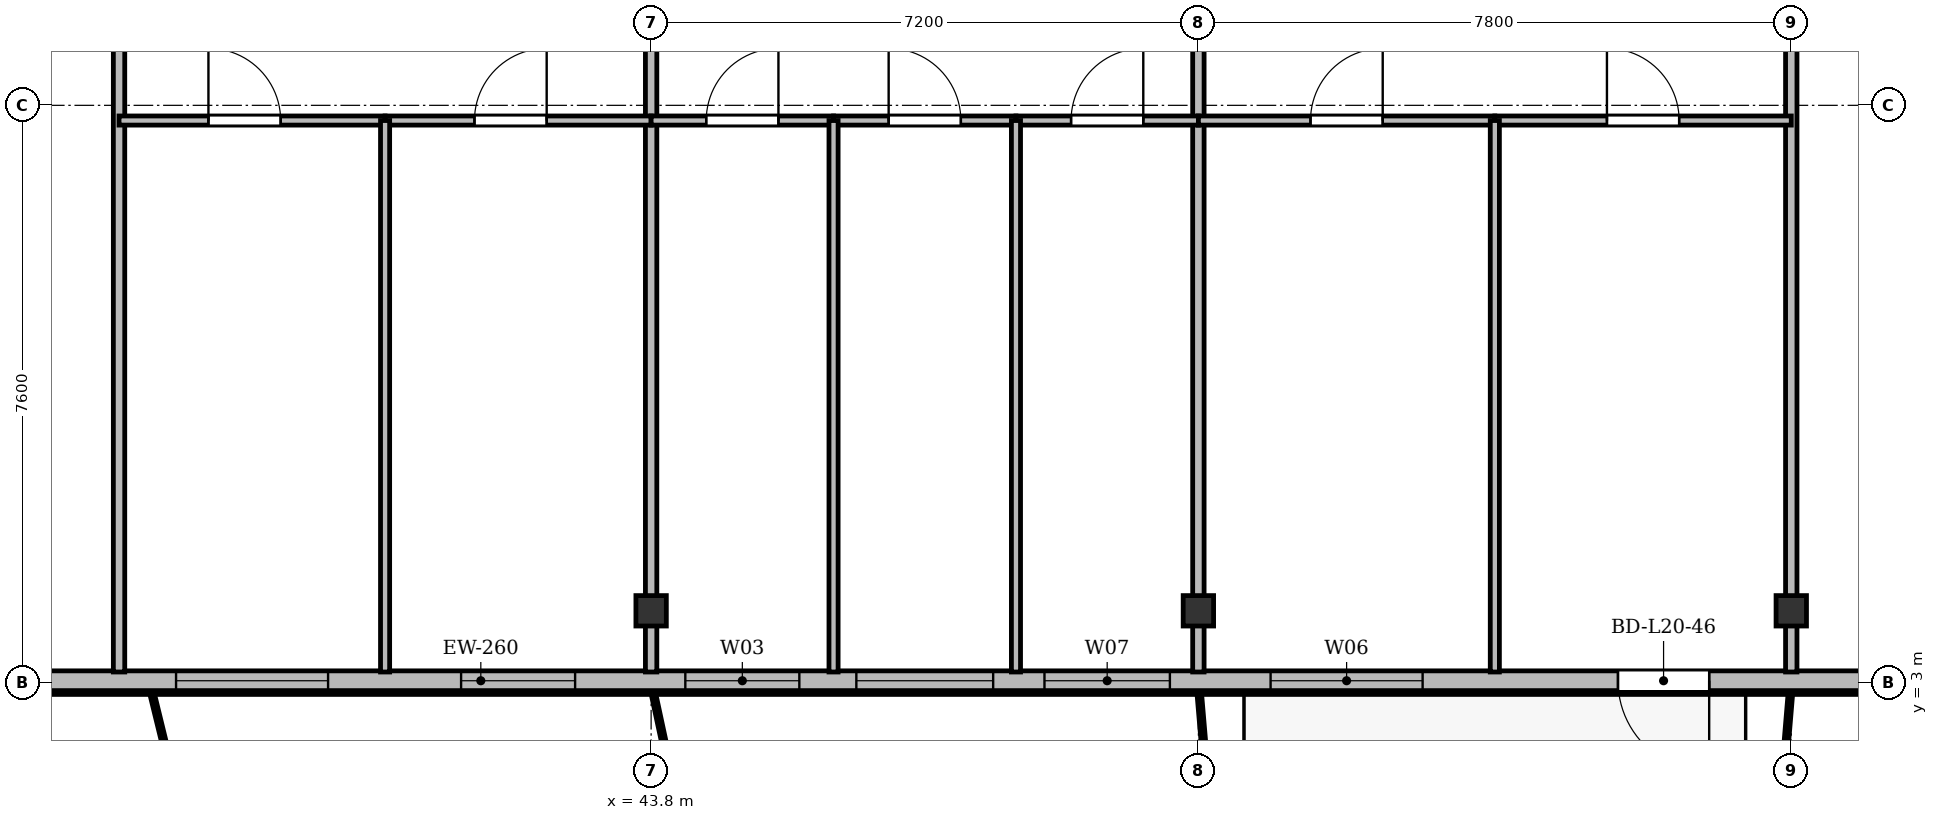
"""IFC4 building model, lengths in metres.
Left out: names, types, materials, properties, quantities, classifications, styles, units other than length and angle.
Written with IfcOpenShell. Run it as: python <this file> out.ifc"""

import sys

from ifc_helpers import new_model, si_unit, direction, frame, frame_2d, origin, origin_2d, place, context, subcontext, project, spatial, rectangle, i_section, extrude, source, transform, mapped, element, fill, save


model = new_model("IFC4")
c1 = context("Model", 3, precision=1e-05, world=origin(), true_north=direction((0.0, 1.0)))
c2 = subcontext(c1, "Body", "Model", "MODEL_VIEW")
j1 = project(units=[si_unit("LENGTHUNIT", "METRE"), si_unit("PLANEANGLEUNIT", "RADIAN")], contexts=[c1])
p1 = place(None, origin())
s1 = spatial("IfcSite", under=j1, at=p1, CompositionType="ELEMENT")
p2 = place(p1, origin())
s2 = spatial("IfcBuilding", under=s1, at=p2, CompositionType="ELEMENT")
p3 = place(p2, frame((0.0, 0.0, 81.7)))
s3 = spatial("IfcBuildingStorey", under=s2, at=p3, CompositionType="ELEMENT", Elevation=81.7)
m1 = source(origin(), c2, "Body", "SweptSolid", [
    extrude(i_section(OverallWidth=0.4, OverallDepth=0.4, WebThickness=0.022, FlangeThickness=0.035, at=origin_2d()), origin(), (0.0, 0.0, 1.0), 3.6),
])
for number, where, z_axis, x_axis in (
    (1, (43.8, 3.95, 0.0), (0.0, 0.0, 1.0), (1.0, 0.0, 0.0)),
    (2, (51.0, 3.95, 0.0), (0.0, 0.0, 1.0), (1.0, 0.0, 0.0)),
    (3, (58.8, 3.95, 0.0), (0.0, 0.0, 1.0), (1.0, 0.0, 0.0)),
):
    element("IfcColumn", number, at=place(p3, frame(where, z_axis=z_axis, x_axis=x_axis)), inside=s3, PredefinedType="COLUMN", context=c2, shape_type="MappedRepresentation", body=[
        mapped(m1, transform((0.0, 0.0, 0.0), x_axis=(1.0, 0.0, 0.0), y_axis=(0.0, 1.0, 0.0), z_axis=(0.0, 0.0, 1.0), scale=1.0)),
    ])
p4 = place(p3, frame((66.9, 3.03, 0.0), z_axis=(0.0, 0.0, 1.0), x_axis=(-1.0, 0.0, 0.0)))
e4 = element("IfcWall", 4, at=p4, inside=s3, PredefinedType="SOLIDWALL", context=c2, shape_type="SweptSolid", body=[
    extrude(rectangle(XDim=59.4, YDim=0.26, at=frame_2d((29.7, 0.0))), origin(), (0.0, 0.0, 1.0), 3.34),
])
p5 = place(p4, frame((0.795, 0.0, 0.9)))
e5 = element("IfcOpeningElement", 5, at=p5, cuts=e4, PredefinedType="OPENING", context=c2, shape_type="SweptSolid", body=[
    extrude(rectangle(XDim=1.8, YDim=1.8, at=frame_2d((0.9, 0.9))), frame((0.0, 0.14, 0.0), z_axis=(0.0, -1.0, 0.0), x_axis=(1.0, 0.0, 0.0)), (0.0, 0.0, 1.0), 0.28),
])
p6 = place(p4, frame((4.6, 0.0, 0.9)))
e6 = element("IfcOpeningElement", 6, at=p6, cuts=e4, PredefinedType="OPENING", context=c2, shape_type="SweptSolid", body=[
    extrude(rectangle(XDim=2.2, YDim=1.8, at=frame_2d((1.1, 0.9))), frame((0.0, 0.14, 0.0), z_axis=(0.0, -1.0, 0.0), x_axis=(1.0, 0.0, 0.0)), (0.0, 0.0, 1.0), 0.28),
])
p7 = place(p4, frame((9.18, 0.0, 0.0)))
e7 = element("IfcOpeningElement", 7, at=p7, cuts=e4, PredefinedType="OPENING", context=c2, shape_type="SweptSolid", body=[
    extrude(rectangle(XDim=1.2, YDim=2.2, at=frame_2d((0.6, 1.1))), frame((0.0, 0.14, 0.0), z_axis=(0.0, -1.0, 0.0), x_axis=(1.0, 0.0, 0.0)), (0.0, 0.0, 1.0), 0.28),
])
p8 = place(p4, frame((12.95, 0.0, 0.9)))
e8 = element("IfcOpeningElement", 8, at=p8, cuts=e4, PredefinedType="OPENING", context=c2, shape_type="SweptSolid", body=[
    extrude(rectangle(XDim=2.0, YDim=1.95, at=frame_2d((1.0, 0.975))), frame((0.0, 0.14, 0.0), z_axis=(0.0, -1.0, 0.0), x_axis=(1.0, 0.0, 0.0)), (0.0, 0.0, 1.0), 0.28),
])
p9 = place(p4, frame((16.275, 0.0, 0.9)))
e9 = element("IfcOpeningElement", 9, at=p9, cuts=e4, PredefinedType="OPENING", context=c2, shape_type="SweptSolid", body=[
    extrude(rectangle(XDim=1.65, YDim=1.85, at=frame_2d((0.825, 0.925))), frame((0.0, 0.14, 0.0), z_axis=(0.0, -1.0, 0.0), x_axis=(1.0, 0.0, 0.0)), (0.0, 0.0, 1.0), 0.28),
])
p10 = place(p4, frame((18.6, 0.0, 0.9)))
e10 = element("IfcOpeningElement", 10, at=p10, cuts=e4, PredefinedType="OPENING", context=c2, shape_type="SweptSolid", body=[
    extrude(rectangle(XDim=1.8, YDim=1.8, at=frame_2d((0.9, 0.9))), frame((0.0, 0.14, 0.0), z_axis=(0.0, -1.0, 0.0), x_axis=(1.0, 0.0, 0.0)), (0.0, 0.0, 1.0), 0.28),
])
p11 = place(p4, frame((21.15, 0.0, 0.9)))
e11 = element("IfcOpeningElement", 11, at=p11, cuts=e4, PredefinedType="OPENING", context=c2, shape_type="SweptSolid", body=[
    extrude(rectangle(XDim=1.5, YDim=1.75, at=frame_2d((0.75, 0.875))), frame((0.0, 0.14, 0.0), z_axis=(0.0, -1.0, 0.0), x_axis=(1.0, 0.0, 0.0)), (0.0, 0.0, 1.0), 0.28),
])
p12 = place(p4, frame((24.1, 0.0, 0.9)))
e12 = element("IfcOpeningElement", 12, at=p12, cuts=e4, PredefinedType="OPENING", context=c2, shape_type="SweptSolid", body=[
    extrude(rectangle(XDim=1.5, YDim=1.75, at=frame_2d((0.75, 0.875))), frame((0.0, 0.14, 0.0), z_axis=(0.0, -1.0, 0.0), x_axis=(1.0, 0.0, 0.0)), (0.0, 0.0, 1.0), 0.28),
])
p13 = place(p4, frame((27.35, 0.0, 0.9)))
e13 = element("IfcOpeningElement", 13, at=p13, cuts=e4, PredefinedType="OPENING", context=c2, shape_type="SweptSolid", body=[
    extrude(rectangle(XDim=2.0, YDim=1.95, at=frame_2d((1.0, 0.975))), frame((0.0, 0.14, 0.0), z_axis=(0.0, -1.0, 0.0), x_axis=(1.0, 0.0, 0.0)), (0.0, 0.0, 1.0), 0.28),
])
p14 = place(p4, frame((32.375, 0.0, 0.9)))
e14 = element("IfcOpeningElement", 14, at=p14, cuts=e4, PredefinedType="OPENING", context=c2, shape_type="SweptSolid", body=[
    extrude(rectangle(XDim=1.65, YDim=1.85, at=frame_2d((0.825, 0.925))), frame((0.0, 0.14, 0.0), z_axis=(0.0, -1.0, 0.0), x_axis=(1.0, 0.0, 0.0)), (0.0, 0.0, 1.0), 0.28),
])
p15 = place(p4, frame((40.301, 0.0, 0.0)))
e15 = element("IfcOpeningElement", 15, at=p15, cuts=e4, PredefinedType="OPENING", context=c2, shape_type="SweptSolid", body=[
    extrude(rectangle(XDim=1.2, YDim=2.2, at=frame_2d((0.6, 1.1))), frame((0.0, 0.14, 0.0), z_axis=(0.0, -1.0, 0.0), x_axis=(1.0, 0.0, 0.0)), (0.0, 0.0, 1.0), 0.28),
])
p16 = place(p4, frame((46.3, 0.0, 0.9)))
e16 = element("IfcOpeningElement", 16, at=p16, cuts=e4, PredefinedType="OPENING", context=c2, shape_type="SweptSolid", body=[
    extrude(rectangle(XDim=2.2, YDim=1.8, at=frame_2d((1.1, 0.9))), frame((0.0, 0.14, 0.0), z_axis=(0.0, -1.0, 0.0), x_axis=(1.0, 0.0, 0.0)), (0.0, 0.0, 1.0), 0.28),
])
p17 = place(p4, frame((54.558, 0.0, 0.0)))
e17 = element("IfcOpeningElement", 17, at=p17, cuts=e4, PredefinedType="OPENING", context=c2, shape_type="SweptSolid", body=[
    extrude(rectangle(XDim=1.2, YDim=2.2, at=frame_2d((0.6, 1.1))), frame((0.0, 0.14, 0.0), z_axis=(0.0, -1.0, 0.0), x_axis=(1.0, 0.0, 0.0)), (0.0, 0.0, 1.0), 0.28),
])
p18 = place(p4, frame((56.805, 0.0, 0.9)))
e18 = element("IfcOpeningElement", 18, at=p18, cuts=e4, PredefinedType="OPENING", context=c2, shape_type="SweptSolid", body=[
    extrude(rectangle(XDim=2.0, YDim=1.95, at=frame_2d((1.0, 0.975))), frame((0.0, 0.14, 0.0), z_axis=(0.0, -1.0, 0.0), x_axis=(1.0, 0.0, 0.0)), (0.0, 0.0, 1.0), 0.28),
])
p19 = place(p3, frame((36.8, 3.145, 0.0), z_axis=(0.0, 0.0, 1.0), x_axis=(0.0, 1.0, 0.0)))
e19 = element("IfcWall", 19, at=p19, inside=s3, PredefinedType="PARTITIONING", context=c2, shape_type="SweptSolid", body=[
    extrude(rectangle(XDim=24.455, YDim=0.15, at=frame_2d((12.228, 0.0))), origin(), (0.0, 0.0, 1.0), 2.752),
])
for number, where, z_axis, x_axis in (
    (20, (43.8, 3.145, 0.0), (0.0, 0.0, 1.0), (0.0, 1.0, 0.0)),
    (21, (51.0, 3.145, 0.0), (0.0, 0.0, 1.0), (0.0, 1.0, 0.0)),
    (22, (58.8, 3.145, 0.0), (0.0, 0.0, 1.0), (0.0, 1.0, 0.0)),
):
    element("IfcWall", number, at=place(p3, frame(where, z_axis=z_axis, x_axis=x_axis)), inside=s3, PredefinedType="PARTITIONING", context=c2, shape_type="SweptSolid", body=[
        extrude(rectangle(XDim=24.455, YDim=0.15, at=frame_2d((12.228, 0.0))), origin(), (0.0, 0.0, 1.0), 2.84),
    ])
p20 = place(p3, frame((36.8, 10.4, 0.0), z_axis=(0.0, 0.0, 1.0), x_axis=(1.0, 0.0, 0.0)))
e23 = element("IfcWall", 23, at=p20, inside=s3, PredefinedType="PARTITIONING", context=c2, shape_type="SweptSolid", body=[
    extrude(rectangle(XDim=3.5, YDim=0.12, at=frame_2d((1.75, 0.0))), origin(), (0.0, 0.0, 1.0), 3.34),
])
p21 = place(p20, frame((1.176, 0.0, 0.0)))
e24 = element("IfcOpeningElement", 24, at=p21, cuts=e23, PredefinedType="OPENING", context=c2, shape_type="SweptSolid", body=[
    extrude(rectangle(XDim=0.95, YDim=2.15, at=frame_2d((0.475, 1.075))), frame((0.0, 0.07, 0.0), z_axis=(0.0, -1.0, 0.0), x_axis=(1.0, 0.0, 0.0)), (0.0, 0.0, 1.0), 0.14),
])
p22 = place(p3, frame((40.3, 10.4, 0.0), z_axis=(0.0, 0.0, 1.0), x_axis=(1.0, 0.0, 0.0)))
e25 = element("IfcWall", 25, at=p22, inside=s3, PredefinedType="PARTITIONING", context=c2, shape_type="SweptSolid", body=[
    extrude(rectangle(XDim=3.5, YDim=0.12, at=frame_2d((1.75, 0.0))), origin(), (0.0, 0.0, 1.0), 2.84),
])
p23 = place(p22, frame((1.176, 0.0, 0.0)))
e26 = element("IfcOpeningElement", 26, at=p23, cuts=e25, PredefinedType="OPENING", context=c2, shape_type="SweptSolid", body=[
    extrude(rectangle(XDim=0.95, YDim=2.15, at=frame_2d((0.475, 1.075))), frame((0.0, 0.07, 0.0), z_axis=(0.0, -1.0, 0.0), x_axis=(1.0, 0.0, 0.0)), (0.0, 0.0, 1.0), 0.14),
])
p24 = place(p3, frame((40.3, 3.145, 0.0), z_axis=(0.0, 0.0, 1.0), x_axis=(0.0, 1.0, 0.0)))
e27 = element("IfcWall", 27, at=p24, inside=s3, PredefinedType="PARTITIONING", context=c2, shape_type="SweptSolid", body=[
    extrude(rectangle(XDim=7.255, YDim=0.12, at=frame_2d((3.627, 0.0))), origin(), (0.0, 0.0, 1.0), 2.752),
])
p25 = place(p3, frame((43.8, 10.4, 0.0), z_axis=(0.0, 0.0, 1.0), x_axis=(1.0, 0.0, 0.0)))
e28 = element("IfcWall", 28, at=p25, inside=s3, PredefinedType="PARTITIONING", context=c2, shape_type="SweptSolid", body=[
    extrude(rectangle(XDim=2.4, YDim=0.12, at=frame_2d((1.2, 0.0))), origin(), (0.0, 0.0, 1.0), 2.84),
])
p26 = place(p25, frame((0.725, 0.0, 0.0)))
e29 = element("IfcOpeningElement", 29, at=p26, cuts=e28, PredefinedType="OPENING", context=c2, shape_type="SweptSolid", body=[
    extrude(rectangle(XDim=0.95, YDim=2.15, at=frame_2d((0.475, 1.075))), frame((0.0, 0.07, 0.0), z_axis=(0.0, -1.0, 0.0), x_axis=(1.0, 0.0, 0.0)), (0.0, 0.0, 1.0), 0.14),
])
p27 = place(p3, frame((46.2, 10.4, 0.0), z_axis=(0.0, 0.0, 1.0), x_axis=(1.0, 0.0, 0.0)))
e30 = element("IfcWall", 30, at=p27, inside=s3, PredefinedType="PARTITIONING", context=c2, shape_type="SweptSolid", body=[
    extrude(rectangle(XDim=2.4, YDim=0.12, at=frame_2d((1.2, 0.0))), origin(), (0.0, 0.0, 1.0), 3.34),
])
p28 = place(p27, frame((0.725, 0.0, 0.0)))
e31 = element("IfcOpeningElement", 31, at=p28, cuts=e30, PredefinedType="OPENING", context=c2, shape_type="SweptSolid", body=[
    extrude(rectangle(XDim=0.95, YDim=2.15, at=frame_2d((0.475, 1.075))), frame((0.0, 0.07, 0.0), z_axis=(0.0, -1.0, 0.0), x_axis=(1.0, 0.0, 0.0)), (0.0, 0.0, 1.0), 0.14),
])
p29 = place(p3, frame((46.2, 3.145, 0.0), z_axis=(0.0, 0.0, 1.0), x_axis=(0.0, 1.0, 0.0)))
e32 = element("IfcWall", 32, at=p29, inside=s3, PredefinedType="PARTITIONING", context=c2, shape_type="SweptSolid", body=[
    extrude(rectangle(XDim=7.255, YDim=0.12, at=frame_2d((3.627, 0.0))), origin(), (0.0, 0.0, 1.0), 2.752),
])
p30 = place(p3, frame((48.6, 10.4, 0.0), z_axis=(0.0, 0.0, 1.0), x_axis=(1.0, 0.0, 0.0)))
e33 = element("IfcWall", 33, at=p30, inside=s3, PredefinedType="PARTITIONING", context=c2, shape_type="SweptSolid", body=[
    extrude(rectangle(XDim=2.4, YDim=0.12, at=frame_2d((1.2, 0.0))), origin(), (0.0, 0.0, 1.0), 2.84),
])
p31 = place(p30, frame((0.725, 0.0, 0.0)))
e34 = element("IfcOpeningElement", 34, at=p31, cuts=e33, PredefinedType="OPENING", context=c2, shape_type="SweptSolid", body=[
    extrude(rectangle(XDim=0.95, YDim=2.15, at=frame_2d((0.475, 1.075))), frame((0.0, 0.07, 0.0), z_axis=(0.0, -1.0, 0.0), x_axis=(1.0, 0.0, 0.0)), (0.0, 0.0, 1.0), 0.14),
])
p32 = place(p3, frame((48.6, 3.145, 0.0), z_axis=(0.0, 0.0, 1.0), x_axis=(0.0, 1.0, 0.0)))
e35 = element("IfcWall", 35, at=p32, inside=s3, PredefinedType="PARTITIONING", context=c2, shape_type="SweptSolid", body=[
    extrude(rectangle(XDim=7.255, YDim=0.12, at=frame_2d((3.627, 0.0))), origin(), (0.0, 0.0, 1.0), 2.752),
])
p33 = place(p3, frame((51.0, 10.4, 0.0), z_axis=(0.0, 0.0, 1.0), x_axis=(1.0, 0.0, 0.0)))
e36 = element("IfcWall", 36, at=p33, inside=s3, PredefinedType="PARTITIONING", context=c2, shape_type="SweptSolid", body=[
    extrude(rectangle(XDim=3.9, YDim=0.12, at=frame_2d((1.95, 0.0))), origin(), (0.0, 0.0, 1.0), 2.84),
])
p34 = place(p33, frame((1.475, 0.0, 0.0)))
e37 = element("IfcOpeningElement", 37, at=p34, cuts=e36, PredefinedType="OPENING", context=c2, shape_type="SweptSolid", body=[
    extrude(rectangle(XDim=0.95, YDim=2.15, at=frame_2d((0.475, 1.075))), frame((0.0, 0.07, 0.0), z_axis=(0.0, -1.0, 0.0), x_axis=(1.0, 0.0, 0.0)), (0.0, 0.0, 1.0), 0.14),
])
p35 = place(p3, frame((54.9, 10.4, 0.0), z_axis=(0.0, 0.0, 1.0), x_axis=(1.0, 0.0, 0.0)))
e38 = element("IfcWall", 38, at=p35, inside=s3, PredefinedType="PARTITIONING", context=c2, shape_type="SweptSolid", body=[
    extrude(rectangle(XDim=3.9, YDim=0.12, at=frame_2d((1.95, 0.0))), origin(), (0.0, 0.0, 1.0), 2.84),
])
p36 = place(p35, frame((1.475, 0.0, 0.0)))
e39 = element("IfcOpeningElement", 39, at=p36, cuts=e38, PredefinedType="OPENING", context=c2, shape_type="SweptSolid", body=[
    extrude(rectangle(XDim=0.95, YDim=2.15, at=frame_2d((0.475, 1.075))), frame((0.0, 0.07, 0.0), z_axis=(0.0, -1.0, 0.0), x_axis=(1.0, 0.0, 0.0)), (0.0, 0.0, 1.0), 0.14),
])
p37 = place(p3, frame((54.9, 3.145, 0.0), z_axis=(0.0, 0.0, 1.0), x_axis=(0.0, 1.0, 0.0)))
e40 = element("IfcWall", 40, at=p37, inside=s3, PredefinedType="PARTITIONING", context=c2, shape_type="SweptSolid", body=[
    extrude(rectangle(XDim=7.255, YDim=0.12, at=frame_2d((3.627, 0.0))), origin(), (0.0, 0.0, 1.0), 2.752),
])
m2 = source(origin(), c2, "Body", "SweptSolid", [
    extrude(rectangle(XDim=1.2, YDim=2.2, at=frame_2d((0.6, 1.1))), frame((0.0, 0.025, 0.0), z_axis=(0.0, -1.0, 0.0), x_axis=(1.0, 0.0, 0.0)), (0.0, 0.0, 1.0), 0.05),
])
p38 = place(p7, origin())
e41 = element("IfcDoor", 41, at=p38, inside=s3, OperationType="SINGLE_SWING_LEFT", PredefinedType="DOOR", context=c2, shape_type="MappedRepresentation", body=[
    mapped(m2, transform((0.0, 0.0, 0.0), x_axis=(1.0, 0.0, 0.0), y_axis=(0.0, 1.0, 0.0), z_axis=(0.0, 0.0, 1.0), scale=1.0)),
])
fill(e7, e41)
m3 = source(origin(), c2, "Body", "SweptSolid", [
    extrude(rectangle(XDim=2.0, YDim=1.95, at=frame_2d((1.0, 0.975))), frame((0.0, 0.03, 0.0), z_axis=(0.0, -1.0, 0.0), x_axis=(1.0, 0.0, 0.0)), (0.0, 0.0, 1.0), 0.06),
])
p39 = place(p8, origin())
e42 = element("IfcWindow", 42, at=p39, inside=s3, PartitioningType="SINGLE_PANEL", PredefinedType="WINDOW", context=c2, shape_type="MappedRepresentation", body=[
    mapped(m3, transform((0.0, 0.0, 0.0), x_axis=(1.0, 0.0, 0.0), y_axis=(0.0, 1.0, 0.0), z_axis=(0.0, 0.0, 1.0), scale=1.0)),
])
fill(e8, e42)
m4 = source(origin(), c2, "Body", "SweptSolid", [
    extrude(rectangle(XDim=1.65, YDim=1.85, at=frame_2d((0.825, 0.925))), frame((0.0, 0.03, 0.0), z_axis=(0.0, -1.0, 0.0), x_axis=(1.0, 0.0, 0.0)), (0.0, 0.0, 1.0), 0.06),
])
p40 = place(p9, origin())
e43 = element("IfcWindow", 43, at=p40, inside=s3, PartitioningType="SINGLE_PANEL", PredefinedType="WINDOW", context=c2, shape_type="MappedRepresentation", body=[
    mapped(m4, transform((0.0, 0.0, 0.0), x_axis=(1.0, 0.0, 0.0), y_axis=(0.0, 1.0, 0.0), z_axis=(0.0, 0.0, 1.0), scale=1.0)),
])
fill(e9, e43)
m5 = source(origin(), c2, "Body", "SweptSolid", [
    extrude(rectangle(XDim=1.8, YDim=1.8, at=frame_2d((0.9, 0.9))), frame((0.0, 0.03, 0.0), z_axis=(0.0, -1.0, 0.0), x_axis=(1.0, 0.0, 0.0)), (0.0, 0.0, 1.0), 0.06),
])
p41 = place(p10, origin())
e44 = element("IfcWindow", 44, at=p41, inside=s3, PartitioningType="SINGLE_PANEL", PredefinedType="WINDOW", context=c2, shape_type="MappedRepresentation", body=[
    mapped(m5, transform((0.0, 0.0, 0.0), x_axis=(1.0, 0.0, 0.0), y_axis=(0.0, 1.0, 0.0), z_axis=(0.0, 0.0, 1.0), scale=1.0)),
])
fill(e10, e44)
m6 = source(origin(), c2, "Body", "SweptSolid", [
    extrude(rectangle(XDim=1.5, YDim=1.75, at=frame_2d((0.75, 0.875))), frame((0.0, 0.03, 0.0), z_axis=(0.0, -1.0, 0.0), x_axis=(1.0, 0.0, 0.0)), (0.0, 0.0, 1.0), 0.06),
])
p42 = place(p11, origin())
e45 = element("IfcWindow", 45, at=p42, inside=s3, PartitioningType="SINGLE_PANEL", PredefinedType="WINDOW", context=c2, shape_type="MappedRepresentation", body=[
    mapped(m6, transform((0.0, 0.0, 0.0), x_axis=(1.0, 0.0, 0.0), y_axis=(0.0, 1.0, 0.0), z_axis=(0.0, 0.0, 1.0), scale=1.0)),
])
fill(e11, e45)
p43 = place(p12, origin())
e46 = element("IfcWindow", 46, at=p43, inside=s3, PartitioningType="SINGLE_PANEL", PredefinedType="WINDOW", context=c2, shape_type="MappedRepresentation", body=[
    mapped(m6, transform((0.0, 0.0, 0.0), x_axis=(1.0, 0.0, 0.0), y_axis=(0.0, 1.0, 0.0), z_axis=(0.0, 0.0, 1.0), scale=1.0)),
])
fill(e12, e46)
p44 = place(p13, origin())
e47 = element("IfcWindow", 47, at=p44, inside=s3, PartitioningType="SINGLE_PANEL", PredefinedType="WINDOW", context=c2, shape_type="MappedRepresentation", body=[
    mapped(m3, transform((0.0, 0.0, 0.0), x_axis=(1.0, 0.0, 0.0), y_axis=(0.0, 1.0, 0.0), z_axis=(0.0, 0.0, 1.0), scale=1.0)),
])
fill(e13, e47)
m7 = source(origin(), c2, "Body", "SweptSolid", [
    extrude(rectangle(XDim=0.95, YDim=2.15, at=frame_2d((0.475, 1.075))), frame((0.0, 0.025, 0.0), z_axis=(0.0, -1.0, 0.0), x_axis=(1.0, 0.0, 0.0)), (0.0, 0.0, 1.0), 0.05),
])
p45 = place(p21, origin())
e48 = element("IfcDoor", 48, at=p45, inside=s3, OperationType="SINGLE_SWING_LEFT", PredefinedType="DOOR", context=c2, shape_type="MappedRepresentation", body=[
    mapped(m7, transform((0.0, 0.0, 0.0), x_axis=(1.0, 0.0, 0.0), y_axis=(0.0, 1.0, 0.0), z_axis=(0.0, 0.0, 1.0), scale=1.0)),
])
fill(e24, e48)
p46 = place(p23, origin())
e49 = element("IfcDoor", 49, at=p46, inside=s3, OperationType="SINGLE_SWING_RIGHT", PredefinedType="DOOR", context=c2, shape_type="MappedRepresentation", body=[
    mapped(m7, transform((0.0, 0.0, 0.0), x_axis=(1.0, 0.0, 0.0), y_axis=(0.0, 1.0, 0.0), z_axis=(0.0, 0.0, 1.0), scale=1.0)),
])
fill(e26, e49)
p47 = place(p26, origin())
e50 = element("IfcDoor", 50, at=p47, inside=s3, OperationType="SINGLE_SWING_RIGHT", PredefinedType="DOOR", context=c2, shape_type="MappedRepresentation", body=[
    mapped(m7, transform((0.0, 0.0, 0.0), x_axis=(1.0, 0.0, 0.0), y_axis=(0.0, 1.0, 0.0), z_axis=(0.0, 0.0, 1.0), scale=1.0)),
])
fill(e29, e50)
p48 = place(p28, origin())
e51 = element("IfcDoor", 51, at=p48, inside=s3, OperationType="SINGLE_SWING_LEFT", PredefinedType="DOOR", context=c2, shape_type="MappedRepresentation", body=[
    mapped(m7, transform((0.0, 0.0, 0.0), x_axis=(1.0, 0.0, 0.0), y_axis=(0.0, 1.0, 0.0), z_axis=(0.0, 0.0, 1.0), scale=1.0)),
])
fill(e31, e51)
p49 = place(p31, origin())
e52 = element("IfcDoor", 52, at=p49, inside=s3, OperationType="SINGLE_SWING_RIGHT", PredefinedType="DOOR", context=c2, shape_type="MappedRepresentation", body=[
    mapped(m7, transform((0.0, 0.0, 0.0), x_axis=(1.0, 0.0, 0.0), y_axis=(0.0, 1.0, 0.0), z_axis=(0.0, 0.0, 1.0), scale=1.0)),
])
fill(e34, e52)
p50 = place(p34, origin())
e53 = element("IfcDoor", 53, at=p50, inside=s3, OperationType="SINGLE_SWING_RIGHT", PredefinedType="DOOR", context=c2, shape_type="MappedRepresentation", body=[
    mapped(m7, transform((0.0, 0.0, 0.0), x_axis=(1.0, 0.0, 0.0), y_axis=(0.0, 1.0, 0.0), z_axis=(0.0, 0.0, 1.0), scale=1.0)),
])
fill(e37, e53)
p51 = place(p36, origin())
e54 = element("IfcDoor", 54, at=p51, inside=s3, OperationType="SINGLE_SWING_LEFT", PredefinedType="DOOR", context=c2, shape_type="MappedRepresentation", body=[
    mapped(m7, transform((0.0, 0.0, 0.0), x_axis=(1.0, 0.0, 0.0), y_axis=(0.0, 1.0, 0.0), z_axis=(0.0, 0.0, 1.0), scale=1.0)),
])
fill(e39, e54)
save(model, sys.argv[1])
